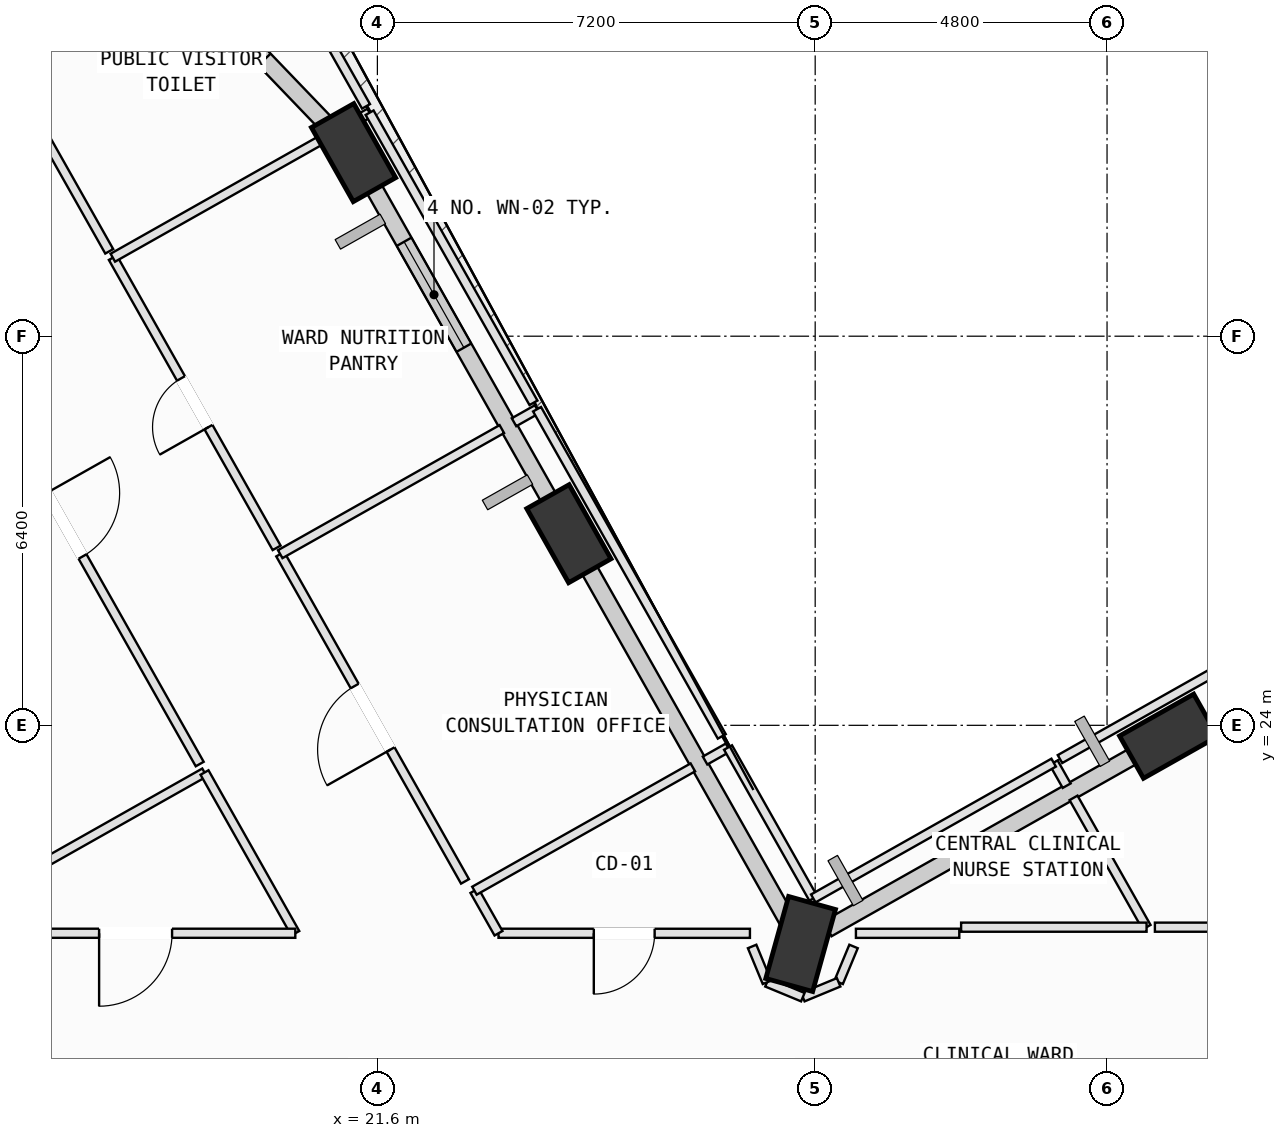
"""IFC4 building model, lengths in metres.
Left out: names, types, materials, properties, quantities, classifications, styles, units other than length and angle.
Written with IfcOpenShell. Run it as: python <this file> out.ifc"""

import sys

from ifc_helpers import new_model, si_unit, direction, frame, frame_2d, origin, origin_2d, place, context, subcontext, project, spatial, rectangle, extrude, element, fill, save


model = new_model("IFC4")
c1 = context("Model", 3, precision=1e-05, world=origin(), true_north=direction((0.0, 1.0)))
c2 = subcontext(c1, "Body", "Model", "MODEL_VIEW")
j1 = project(units=[si_unit("LENGTHUNIT", "METRE"), si_unit("PLANEANGLEUNIT", "RADIAN")], contexts=[c1])
p1 = place(None, origin())
s1 = spatial("IfcSite", under=j1, at=p1, CompositionType="ELEMENT")
p2 = place(p1, origin())
s2 = spatial("IfcBuilding", under=s1, at=p2, CompositionType="ELEMENT")
p3 = place(p2, frame((0.0, 0.0, 149.8)))
s3 = spatial("IfcBuildingStorey", under=s2, at=p3, CompositionType="ELEMENT", Elevation=149.8)
p4 = place(p3, frame((34.612, 23.821, 0.007), z_axis=(0.004036875309, 0.004220369641, 0.999982945913), x_axis=(-0.969109138481, 0.246615556484, 0.002871412915)))
e1 = element("IfcColumn", 1, at=p4, inside=s3, PredefinedType="COLUMN", context=c2, shape_type="SweptSolid", body=[
    extrude(rectangle(XDim=1.4, YDim=0.8, at=origin_2d()), origin(), (0.0, 0.0, 1.0), 3.991),
])
p5 = place(p3, frame((28.561, 20.404, 0.024), z_axis=(0.018362422681, -0.020757521292, 0.999615899605), x_axis=(-0.437286029614, 0.8989260661, 0.026699363101)))
e2 = element("IfcColumn", 2, at=p5, inside=s3, PredefinedType="COLUMN", context=c2, shape_type="SweptSolid", body=[
    extrude(rectangle(XDim=1.4, YDim=0.8, at=origin_2d()), origin(), (0.0, 0.0, 1.0), 3.975),
])
p6 = place(p3, frame((24.75, 27.151, 0.033), z_axis=(-0.009475349631, -0.036732361882, 0.999280216626), x_axis=(-0.258731332991, 0.965384335227, 0.033033053559)))
e3 = element("IfcColumn", 3, at=p6, inside=s3, PredefinedType="COLUMN", context=c2, shape_type="SweptSolid", body=[
    extrude(rectangle(XDim=1.4, YDim=0.8, at=origin_2d()), origin(), (0.0, 0.0, 1.0), 3.968),
])
p7 = place(p3, frame((21.208, 33.419, 0.053), z_axis=(-0.035203563334, -0.051508371615, 0.998051900846), x_axis=(0.084473299342, 0.994943607494, 0.054327521614)))
e4 = element("IfcColumn", 4, at=p7, inside=s3, PredefinedType="COLUMN", context=c2, shape_type="SweptSolid", body=[
    extrude(rectangle(XDim=1.4, YDim=0.8, at=origin_2d()), origin(), (0.0, 0.0, 1.0), 3.953),
])
p8 = place(p3, frame((29.0, 20.652, 0.0), z_axis=(0.0, 0.0, 1.0), x_axis=(0.870797720875, 0.491641464199, 0.0)))
e5 = element("IfcWall", 5, at=p8, inside=s3, PredefinedType="SOLIDWALL", context=c2, shape_type="SweptSolid", body=[
    extrude(rectangle(XDim=5.96, YDim=0.28, at=frame_2d((2.98, 0.0))), origin(), (0.0, 0.0, 1.0), 2.765),
])
p9 = place(p3, frame((28.343, 20.789, 0.0), z_axis=(0.0, 0.0, 1.0), x_axis=(-0.491647818014, 0.87079413356, 0.0)))
e6 = element("IfcWall", 6, at=p9, inside=s3, PredefinedType="SOLIDWALL", context=c2, shape_type="SweptSolid", body=[
    extrude(rectangle(XDim=6.76, YDim=0.28, at=frame_2d((3.38, 0.0))), origin(), (0.0, 0.0, 1.0), 3.165),
])
p10 = place(p3, frame((24.534, 27.535, 0.0), z_axis=(0.0, 0.0, 1.0), x_axis=(-0.491640915593, 0.870798030611, 0.0)))
e7 = element("IfcWall", 7, at=p10, inside=s3, PredefinedType="SOLIDWALL", context=c2, shape_type="SweptSolid", body=[
    extrude(rectangle(XDim=6.223, YDim=0.28, at=frame_2d((3.111, 0.0))), origin(), (0.0, 0.0, 1.0), 3.165),
])
p11 = place(p10, frame((3.074, 0.0, 0.75)))
e8 = element("IfcOpeningElement", 8, at=p11, cuts=e7, PredefinedType="OPENING", context=c2, shape_type="SweptSolid", body=[
    extrude(rectangle(XDim=2.0, YDim=1.95, at=frame_2d((1.0, 0.975))), frame((0.0, 0.15, 0.0), z_axis=(0.0, -1.0, 0.0), x_axis=(1.0, 0.0, 0.0)), (0.0, 0.0, 1.0), 0.3),
])
p12 = place(p3, frame((17.368, 37.425, 0.0), z_axis=(0.0, 0.0, 1.0), x_axis=(0.692504883459, -0.721413187005, 0.0)))
e9 = element("IfcWall", 9, at=p12, inside=s3, PredefinedType="SOLIDWALL", context=c2, shape_type="SweptSolid", body=[
    extrude(rectangle(XDim=5.093, YDim=0.28, at=frame_2d((2.546, 0.0))), origin(), (0.0, 0.0, 1.0), 3.165),
])
p13 = place(p12, frame((2.03, 0.0, 0.75)))
e10 = element("IfcOpeningElement", 10, at=p13, cuts=e9, PredefinedType="OPENING", context=c2, shape_type="SweptSolid", body=[
    extrude(rectangle(XDim=1.4, YDim=1.85, at=frame_2d((0.7, 0.925))), frame((0.0, 0.15, 0.0), z_axis=(0.0, -1.0, 0.0), x_axis=(1.0, 0.0, 0.0)), (0.0, 0.0, 1.0), 0.3),
])
p14 = place(p3, frame((10.163, 33.903, 0.0), z_axis=(0.0, 0.0, 1.0), x_axis=(0.87077907775, 0.491674483528, 0.0)))
e11 = element("IfcWall", 11, at=p14, inside=s3, PredefinedType="SOLIDWALL", context=c2, shape_type="SweptSolid", body=[
    extrude(rectangle(XDim=7.231, YDim=0.28, at=frame_2d((3.615, 0.0))), origin(), (0.0, 0.0, 1.0), 3.165),
])
p15 = place(p3, frame((6.884, 16.519, 0.0), z_axis=(0.0, 0.0, 1.0), x_axis=(0.870744187076, 0.491736271464, 0.0)))
e12 = element("IfcWall", 12, at=p15, inside=s3, PredefinedType="PARTITIONING", context=c2, shape_type="SweptSolid", body=[
    extrude(rectangle(XDim=13.635, YDim=0.15, at=frame_2d((6.818, 0.0))), origin(), (0.0, 0.0, 1.0), 3.78),
])
p16 = place(p3, frame((18.757, 23.224, 0.0), z_axis=(0.0, 0.0, 1.0), x_axis=(0.491673041497, -0.870779891973, 0.0)))
e13 = element("IfcWall", 13, at=p16, inside=s3, PredefinedType="PARTITIONING", context=c2, shape_type="SweptSolid", body=[
    extrude(rectangle(XDim=3.036, YDim=0.15, at=frame_2d((1.518, 0.0))), origin(), (0.0, 0.0, 1.0), 3.78),
])
p17 = place(p3, frame((20.25, 20.58, 0.0), z_axis=(0.0, 0.0, 1.0), x_axis=(-1.0, 0.0, 0.0)))
e14 = element("IfcWall", 14, at=p17, inside=s3, PredefinedType="PARTITIONING", context=c2, shape_type="SweptSolid", body=[
    extrude(rectangle(XDim=5.253, YDim=0.15, at=frame_2d((2.626, 0.0))), origin(), (0.0, 0.0, 1.0), 3.78),
])
p18 = place(p17, frame((2.027, 0.0, 0.0)))
e15 = element("IfcOpeningElement", 15, at=p18, cuts=e14, PredefinedType="OPENING", context=c2, shape_type="SweptSolid", body=[
    extrude(rectangle(XDim=1.2, YDim=2.15, at=frame_2d((0.6, 1.075))), frame((0.0, 0.085, 0.0), z_axis=(0.0, -1.0, 0.0), x_axis=(1.0, 0.0, 0.0)), (0.0, 0.0, 1.0), 0.17),
])
p19 = place(p3, frame((14.234, 31.235, 0.0), z_axis=(0.0, 0.0, 1.0), x_axis=(0.491609563099, -0.870815731065, 0.0)))
e16 = element("IfcWall", 16, at=p19, inside=s3, PredefinedType="PARTITIONING", context=c2, shape_type="SweptSolid", body=[
    extrude(rectangle(XDim=9.04, YDim=0.15, at=frame_2d((4.52, 0.0))), origin(), (0.0, 0.0, 1.0), 3.78),
])
p20 = place(p19, frame((3.92, 0.0, 0.0)))
e17 = element("IfcOpeningElement", 17, at=p20, cuts=e16, PredefinedType="OPENING", context=c2, shape_type="SweptSolid", body=[
    extrude(rectangle(XDim=1.2, YDim=2.15, at=frame_2d((0.6, 1.075))), frame((0.0, 0.085, 0.0), z_axis=(0.0, -1.0, 0.0), x_axis=(1.0, 0.0, 0.0)), (0.0, 0.0, 1.0), 0.17),
])
p21 = place(p3, frame((32.722, 23.386, 0.0), z_axis=(0.0, 0.0, 1.0), x_axis=(0.491964831571, -0.870615072519, 0.0)))
e18 = element("IfcWall", 18, at=p21, inside=s3, PredefinedType="PARTITIONING", context=c2, shape_type="SweptSolid", body=[
    extrude(rectangle(XDim=0.435, YDim=0.15, at=frame_2d((0.218, 0.0))), origin(), (0.0, 0.0, 1.0), 3.78),
])
p22 = place(p3, frame((33.049, 22.807, 0.0), z_axis=(0.0, 0.0, 1.0), x_axis=(0.491665273571, -0.870784277973, 0.0)))
e19 = element("IfcWall", 19, at=p22, inside=s3, PredefinedType="PARTITIONING", context=c2, shape_type="SweptSolid", body=[
    extrude(rectangle(XDim=2.443, YDim=0.15, at=frame_2d((1.221, 0.0))), origin(), (0.0, 0.0, 1.0), 3.78),
])
p23 = place(p3, frame((34.25, 20.68, 0.0), z_axis=(0.0, 0.0, 1.0), x_axis=(-1.0, 0.0, 0.0)))
e20 = element("IfcWall", 20, at=p23, inside=s3, PredefinedType="PARTITIONING", context=c2, shape_type="SweptSolid", body=[
    extrude(rectangle(XDim=3.05, YDim=0.15, at=frame_2d((1.525, 0.0))), origin(), (0.0, 0.0, 1.0), 3.78),
])
p24 = place(p3, frame((31.17, 20.58, 0.0), z_axis=(0.0, 0.0, 1.0), x_axis=(-0.999999834995, -0.000574464935, 0.0)))
e21 = element("IfcWall", 21, at=p24, inside=s3, PredefinedType="PARTITIONING", context=c2, shape_type="SweptSolid", body=[
    extrude(rectangle(XDim=1.7, YDim=0.15, at=frame_2d((0.85, 0.0))), origin(), (0.0, 0.0, 1.0), 3.78),
])
p25 = place(p3, frame((29.431, 20.363, 0.0), z_axis=(0.0, 0.0, 1.0), x_axis=(-0.383285413275, -0.923629954024, 0.0)))
e22 = element("IfcWall", 22, at=p25, inside=s3, PredefinedType="PARTITIONING", context=c2, shape_type="SweptSolid", body=[
    extrude(rectangle(XDim=0.639, YDim=0.15, at=frame_2d((0.319, 0.0))), origin(), (0.0, 0.0, 1.0), 3.78),
])
p26 = place(p3, frame((29.186, 19.773, 0.0), z_axis=(0.0, 0.0, 1.0), x_axis=(-0.923946844683, -0.382520885967, 0.0)))
e23 = element("IfcWall", 23, at=p26, inside=s3, PredefinedType="PARTITIONING", context=c2, shape_type="SweptSolid", body=[
    extrude(rectangle(XDim=0.638, YDim=0.15, at=frame_2d((0.319, 0.0))), origin(), (0.0, 0.0, 1.0), 3.78),
])
p27 = place(p3, frame((28.597, 19.529, 0.0), z_axis=(0.0, 0.0, 1.0), x_axis=(-0.924114659462, 0.382115291723, 0.0)))
e24 = element("IfcWall", 24, at=p27, inside=s3, PredefinedType="PARTITIONING", context=c2, shape_type="SweptSolid", body=[
    extrude(rectangle(XDim=0.638, YDim=0.15, at=frame_2d((0.319, 0.0))), origin(), (0.0, 0.0, 1.0), 3.78),
])
p28 = place(p3, frame((28.007, 19.773, 0.0), z_axis=(0.0, 0.0, 1.0), x_axis=(-0.382306769343, 0.924035461503, 0.0)))
e25 = element("IfcWall", 25, at=p28, inside=s3, PredefinedType="PARTITIONING", context=c2, shape_type="SweptSolid", body=[
    extrude(rectangle(XDim=0.639, YDim=0.15, at=frame_2d((0.319, 0.0))), origin(), (0.0, 0.0, 1.0), 3.78),
])
p29 = place(p3, frame((27.727, 20.579, 0.0), z_axis=(0.0, 0.0, 1.0), x_axis=(-0.999999972112, 0.000236169327, 0.0)))
e26 = element("IfcWall", 26, at=p29, inside=s3, PredefinedType="PARTITIONING", context=c2, shape_type="SweptSolid", body=[
    extrude(rectangle(XDim=4.135, YDim=0.15, at=frame_2d((2.067, 0.0))), origin(), (0.0, 0.0, 1.0), 3.78),
])
p30 = place(p29, frame((1.567, 0.0, 0.0)))
e27 = element("IfcOpeningElement", 27, at=p30, cuts=e26, PredefinedType="OPENING", context=c2, shape_type="SweptSolid", body=[
    extrude(rectangle(XDim=1.0, YDim=2.12, at=frame_2d((0.5, 1.06))), frame((0.0, 0.085, 0.0), z_axis=(0.0, -1.0, 0.0), x_axis=(1.0, 0.0, 0.0)), (0.0, 0.0, 1.0), 0.17),
])
p31 = place(p3, frame((23.592, 20.58, 0.0), z_axis=(0.0, 0.0, 1.0), x_axis=(-0.492407334618, 0.870364875678, 0.0)))
e28 = element("IfcWall", 28, at=p31, inside=s3, PredefinedType="PARTITIONING", context=c2, shape_type="SweptSolid", body=[
    extrude(rectangle(XDim=0.804, YDim=0.15, at=frame_2d((0.402, 0.0))), origin(), (0.0, 0.0, 1.0), 3.78),
])
p32 = place(p3, frame((23.196, 21.28, 0.0), z_axis=(0.0, 0.0, 1.0), x_axis=(0.870792023314, 0.491651555609, 0.0)))
e29 = element("IfcWall", 29, at=p32, inside=s3, PredefinedType="PARTITIONING", context=c2, shape_type="SweptSolid", body=[
    extrude(rectangle(XDim=4.125, YDim=0.15, at=frame_2d((2.062, 0.0))), origin(), (0.0, 0.0, 1.0), 3.78),
])
p33 = place(p3, frame((26.989, 23.421, 0.0), z_axis=(0.0, 0.0, 1.0), x_axis=(0.870070398862, 0.492927480492, 0.0)))
e30 = element("IfcWall", 30, at=p33, inside=s3, PredefinedType="PARTITIONING", context=c2, shape_type="SweptSolid", body=[
    extrude(rectangle(XDim=0.434, YDim=0.15, at=frame_2d((0.217, 0.0))), origin(), (0.0, 0.0, 1.0), 3.78),
])
p34 = place(p3, frame((27.367, 23.635, 0.0), z_axis=(0.0, 0.0, 1.0), x_axis=(0.49186251725, -0.87067288009, 0.0)))
e31 = element("IfcWall", 31, at=p34, inside=s3, PredefinedType="PARTITIONING", context=c2, shape_type="SweptSolid", body=[
    extrude(rectangle(XDim=2.851, YDim=0.15, at=frame_2d((1.425, 0.0))), origin(), (0.0, 0.0, 1.0), 3.78),
])
p35 = place(p3, frame((28.769, 21.153, 0.0), z_axis=(0.0, 0.0, 1.0), x_axis=(0.870688005498, 0.491835741973, 0.0)))
e32 = element("IfcWall", 32, at=p35, inside=s3, PredefinedType="PARTITIONING", context=c2, shape_type="SweptSolid", body=[
    extrude(rectangle(XDim=4.54, YDim=0.15, at=frame_2d((2.27, 0.0))), origin(), (0.0, 0.0, 1.0), 3.78),
])
p36 = place(p3, frame((32.826, 23.445, 0.0), z_axis=(0.0, 0.0, 1.0), x_axis=(0.870956203304, 0.491360653621, 0.0)))
e33 = element("IfcWall", 33, at=p36, inside=s3, PredefinedType="PARTITIONING", context=c2, shape_type="SweptSolid", body=[
    extrude(rectangle(XDim=2.888, YDim=0.15, at=frame_2d((1.444, 0.0))), origin(), (0.0, 0.0, 1.0), 3.78),
])
p37 = place(p3, frame((41.2, 20.68, 0.0), z_axis=(0.0, 0.0, 1.0), x_axis=(-1.0, 0.0, 0.0)))
e34 = element("IfcWall", 34, at=p37, inside=s3, PredefinedType="PARTITIONING", context=c2, shape_type="SweptSolid", body=[
    extrude(rectangle(XDim=6.813, YDim=0.15, at=frame_2d((3.406, 0.0))), origin(), (0.0, 0.0, 1.0), 3.415),
])
p38 = place(p37, frame((2.806, 0.0, 0.0)))
e35 = element("IfcOpeningElement", 35, at=p38, cuts=e34, PredefinedType="OPENING", context=c2, shape_type="SweptSolid", body=[
    extrude(rectangle(XDim=1.2, YDim=2.15, at=frame_2d((0.6, 1.075))), frame((0.0, 0.085, 0.0), z_axis=(0.0, -1.0, 0.0), x_axis=(1.0, 0.0, 0.0)), (0.0, 0.0, 1.0), 0.17),
])
p39 = place(p3, frame((23.041, 21.433, 0.0), z_axis=(0.0, 0.0, 1.0), x_axis=(-0.49170838603, 0.870759934258, 0.0)))
e36 = element("IfcWall", 36, at=p39, inside=s3, PredefinedType="PARTITIONING", context=c2, shape_type="SweptSolid", body=[
    extrude(rectangle(XDim=6.181, YDim=0.15, at=frame_2d((3.09, 0.0))), origin(), (0.0, 0.0, 1.0), 3.78),
])
p40 = place(p39, frame((2.49, 0.0, 0.0)))
e37 = element("IfcOpeningElement", 37, at=p40, cuts=e36, PredefinedType="OPENING", context=c2, shape_type="SweptSolid", body=[
    extrude(rectangle(XDim=1.2, YDim=2.15, at=frame_2d((0.6, 1.075))), frame((0.0, 0.085, 0.0), z_axis=(0.0, -1.0, 0.0), x_axis=(1.0, 0.0, 0.0)), (0.0, 0.0, 1.0), 0.17),
])
p41 = place(p3, frame((20.002, 26.815, 0.0), z_axis=(0.0, 0.0, 1.0), x_axis=(0.870879884138, 0.49149590782, 0.0)))
e38 = element("IfcWall", 38, at=p41, inside=s3, PredefinedType="PARTITIONING", context=c2, shape_type="SweptSolid", body=[
    extrude(rectangle(XDim=4.186, YDim=0.15, at=frame_2d((2.093, 0.0))), origin(), (0.0, 0.0, 1.0), 3.78),
])
p42 = place(p3, frame((23.847, 28.985, 0.0), z_axis=(0.0, 0.0, 1.0), x_axis=(0.870990775269, 0.491299368407, 0.0)))
e39 = element("IfcWall", 39, at=p42, inside=s3, PredefinedType="PARTITIONING", context=c2, shape_type="SweptSolid", body=[
    extrude(rectangle(XDim=0.435, YDim=0.15, at=frame_2d((0.218, 0.0))), origin(), (0.0, 0.0, 1.0), 3.78),
])
p43 = place(p3, frame((24.226, 29.199, 0.0), z_axis=(0.0, 0.0, 1.0), x_axis=(0.49162626276, -0.870806303241, 0.0)))
e40 = element("IfcWall", 40, at=p43, inside=s3, PredefinedType="PARTITIONING", context=c2, shape_type="SweptSolid", body=[
    extrude(rectangle(XDim=6.179, YDim=0.15, at=frame_2d((3.09, 0.0))), origin(), (0.0, 0.0, 1.0), 3.78),
])
p44 = place(p3, frame((19.943, 26.919, 0.0), z_axis=(0.0, 0.0, 1.0), x_axis=(-0.491627062899, 0.870805851511, 0.0)))
e41 = element("IfcWall", 41, at=p44, inside=s3, PredefinedType="PARTITIONING", context=c2, shape_type="SweptSolid", body=[
    extrude(rectangle(XDim=5.48, YDim=0.15, at=frame_2d((2.74, 0.0))), origin(), (0.0, 0.0, 1.0), 3.78),
])
p45 = place(p44, frame((2.28, 0.0, 0.0)))
e42 = element("IfcOpeningElement", 42, at=p45, cuts=e41, PredefinedType="OPENING", context=c2, shape_type="SweptSolid", body=[
    extrude(rectangle(XDim=0.92, YDim=2.1, at=frame_2d((0.46, 1.05))), frame((0.0, 0.085, 0.0), z_axis=(0.0, -1.0, 0.0), x_axis=(1.0, 0.0, 0.0)), (0.0, 0.0, 1.0), 0.17),
])
p46 = place(p3, frame((17.249, 31.691, 0.0), z_axis=(0.0, 0.0, 1.0), x_axis=(0.870728177917, 0.491764618675, 0.0)))
e43 = element("IfcWall", 43, at=p46, inside=s3, PredefinedType="PARTITIONING", context=c2, shape_type="SweptSolid", body=[
    extrude(rectangle(XDim=4.069, YDim=0.15, at=frame_2d((2.035, 0.0))), origin(), (0.0, 0.0, 1.0), 3.78),
])
p47 = place(p3, frame((20.995, 33.806, 0.0), z_axis=(0.0, 0.0, 1.0), x_axis=(0.870155930742, 0.492776476908, 0.0)))
e44 = element("IfcWall", 44, at=p47, inside=s3, PredefinedType="PARTITIONING", context=c2, shape_type="SweptSolid", body=[
    extrude(rectangle(XDim=0.548, YDim=0.15, at=frame_2d((0.274, 0.0))), origin(), (0.0, 0.0, 1.0), 3.78),
])
p48 = place(p3, frame((21.472, 34.076, 0.0), z_axis=(0.0, 0.0, 1.0), x_axis=(0.491762179601, -0.870729555438, 0.0)))
e45 = element("IfcWall", 45, at=p48, inside=s3, PredefinedType="PARTITIONING", context=c2, shape_type="SweptSolid", body=[
    extrude(rectangle(XDim=5.48, YDim=0.15, at=frame_2d((2.74, 0.0))), origin(), (0.0, 0.0, 1.0), 3.78),
])
p49 = place(p3, frame((19.28, 37.96, 0.0), z_axis=(0.0, 0.0, 1.0), x_axis=(0.491449194126, -0.870906246155, 0.0)))
e46 = element("IfcWall", 46, at=p49, inside=s3, PredefinedType="PARTITIONING", context=c2, shape_type="SweptSolid", body=[
    extrude(rectangle(XDim=4.34, YDim=0.15, at=frame_2d((2.17, 0.0))), origin(), (0.0, 0.0, 1.0), 3.78),
])
p50 = place(p3, frame((17.19, 31.796, 0.0), z_axis=(0.0, 0.0, 1.0), x_axis=(-0.49162033615, 0.870809649168, 0.0)))
e47 = element("IfcWall", 47, at=p50, inside=s3, PredefinedType="PARTITIONING", context=c2, shape_type="SweptSolid", body=[
    extrude(rectangle(XDim=5.175, YDim=0.15, at=frame_2d((2.587, 0.0))), origin(), (0.0, 0.0, 1.0), 3.78),
])
p51 = place(p50, frame((2.127, 0.0, 0.0)))
e48 = element("IfcOpeningElement", 48, at=p51, cuts=e47, PredefinedType="OPENING", context=c2, shape_type="SweptSolid", body=[
    extrude(rectangle(XDim=0.92, YDim=2.1, at=frame_2d((0.46, 1.05))), frame((0.0, 0.085, 0.0), z_axis=(0.0, -1.0, 0.0), x_axis=(1.0, 0.0, 0.0)), (0.0, 0.0, 1.0), 0.17),
])
p52 = place(p11, origin())
e49 = element("IfcWindow", 49, at=p52, inside=s3, PartitioningType="SINGLE_PANEL", PredefinedType="WINDOW", context=c2, shape_type="SweptSolid", body=[
    extrude(rectangle(XDim=2.0, YDim=1.95, at=frame_2d((1.0, 0.975))), frame((0.0, 0.03, 0.0), z_axis=(0.0, -1.0, 0.0), x_axis=(1.0, 0.0, 0.0)), (0.0, 0.0, 1.0), 0.06),
])
fill(e8, e49)
p53 = place(p13, origin())
e50 = element("IfcWindow", 50, at=p53, inside=s3, PartitioningType="SINGLE_PANEL", PredefinedType="WINDOW", context=c2, shape_type="SweptSolid", body=[
    extrude(rectangle(XDim=1.4, YDim=1.85, at=frame_2d((0.7, 0.925))), frame((0.0, 0.03, 0.0), z_axis=(0.0, -1.0, 0.0), x_axis=(1.0, 0.0, 0.0)), (0.0, 0.0, 1.0), 0.06),
])
fill(e10, e50)
p54 = place(p18, origin())
e51 = element("IfcDoor", 51, at=p54, inside=s3, OperationType="SINGLE_SWING_RIGHT", PredefinedType="DOOR", context=c2, shape_type="SweptSolid", body=[
    extrude(rectangle(XDim=1.2, YDim=2.15, at=frame_2d((0.6, 1.075))), frame((0.0, 0.025, 0.0), z_axis=(0.0, -1.0, 0.0), x_axis=(1.0, 0.0, 0.0)), (0.0, 0.0, 1.0), 0.05),
])
fill(e15, e51)
p55 = place(p20, origin())
e52 = element("IfcDoor", 52, at=p55, inside=s3, OperationType="SINGLE_SWING_LEFT", PredefinedType="DOOR", context=c2, shape_type="SweptSolid", body=[
    extrude(rectangle(XDim=1.2, YDim=2.15, at=frame_2d((0.6, 1.075))), frame((0.0, 0.025, 0.0), z_axis=(0.0, -1.0, 0.0), x_axis=(1.0, 0.0, 0.0)), (0.0, 0.0, 1.0), 0.05),
])
fill(e17, e52)
p56 = place(p30, origin())
e53 = element("IfcDoor", 53, at=p56, inside=s3, OperationType="SINGLE_SWING_RIGHT", PredefinedType="DOOR", context=c2, shape_type="SweptSolid", body=[
    extrude(rectangle(XDim=1.0, YDim=2.12, at=frame_2d((0.5, 1.06))), frame((0.0, 0.025, 0.0), z_axis=(0.0, -1.0, 0.0), x_axis=(1.0, 0.0, 0.0)), (0.0, 0.0, 1.0), 0.05),
])
fill(e27, e53)
p57 = place(p40, origin())
e54 = element("IfcDoor", 54, at=p57, inside=s3, OperationType="SINGLE_SWING_LEFT", PredefinedType="DOOR", context=c2, shape_type="SweptSolid", body=[
    extrude(rectangle(XDim=1.2, YDim=2.15, at=frame_2d((0.6, 1.075))), frame((0.0, 0.025, 0.0), z_axis=(0.0, -1.0, 0.0), x_axis=(1.0, 0.0, 0.0)), (0.0, 0.0, 1.0), 0.05),
])
fill(e37, e54)
p58 = place(p45, origin())
e55 = element("IfcDoor", 55, at=p58, inside=s3, OperationType="SINGLE_SWING_LEFT", PredefinedType="DOOR", context=c2, shape_type="SweptSolid", body=[
    extrude(rectangle(XDim=0.92, YDim=2.1, at=frame_2d((0.46, 1.05))), frame((0.0, 0.025, 0.0), z_axis=(0.0, -1.0, 0.0), x_axis=(1.0, 0.0, 0.0)), (0.0, 0.0, 1.0), 0.05),
])
fill(e42, e55)
save(model, sys.argv[1])
